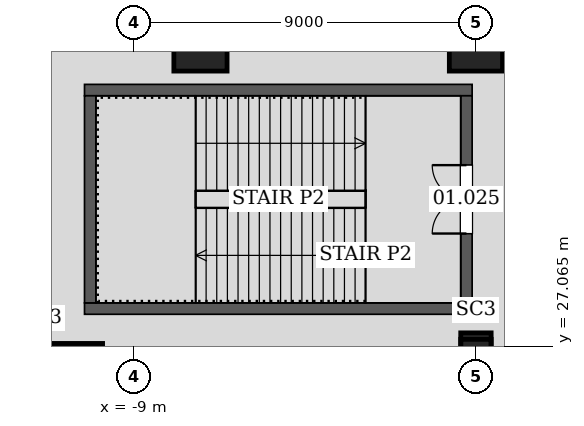
"""IFC4 building model, lengths in metres.
Left out: names, types, materials, properties, quantities, classifications, styles, units other than length and angle.
Written with IfcOpenShell. Run it as: python <this file> out.ifc"""

import sys

from ifc_helpers import new_model, si_unit, direction, frame, frame_2d, origin, origin_2d, place, context, subcontext, project, spatial, rectangle, hollow_rectangle, extrude, element, fill, save


model = new_model("IFC4")
c1 = context("Model", 3, precision=1e-05, world=origin(), true_north=direction((0.0, 1.0)))
c2 = subcontext(c1, "Body", "Model", "MODEL_VIEW")
j1 = project(units=[si_unit("LENGTHUNIT", "METRE"), si_unit("PLANEANGLEUNIT", "RADIAN")], contexts=[c1])
p1 = place(None, origin())
s1 = spatial("IfcSite", under=j1, at=p1, CompositionType="ELEMENT")
p2 = place(p1, origin())
s2 = spatial("IfcBuilding", under=s1, at=p2, CompositionType="ELEMENT")
p3 = place(p2, frame((0.0, 0.0, 7.2)))
s3 = spatial("IfcBuildingStorey", under=s2, at=p3, CompositionType="ELEMENT", Elevation=7.2)
p4 = place(p3, frame((-10.824, 26.133, 0.0), z_axis=(0.011713263234, -0.028266381762, 0.999531795956), x_axis=(0.923822387517, 0.38282136346, 0.0)))
e1 = element("IfcColumn", 1, at=p4, inside=s3, PredefinedType="COLUMN", context=c2, shape_type="SweptSolid", body=[
    extrude(hollow_rectangle(XDim=2.0, YDim=2.0, WallThickness=0.09, at=origin_2d()), origin(), (0.0, 0.0, 1.0), 6.003),
])
p5 = place(p3, frame((0.0, 27.011, 0.0), z_axis=(0.0, -0.028268321043, 0.999600371161), x_axis=(1.0, 0.0, 0.0)))
e2 = element("IfcColumn", 2, at=p5, inside=s3, PredefinedType="COLUMN", context=c2, shape_type="SweptSolid", body=[
    extrude(hollow_rectangle(XDim=0.8, YDim=0.8, WallThickness=0.05, at=origin_2d()), origin(), (0.0, 0.0, 1.0), 6.002),
])
for number, where, z_axis, x_axis in (
    (3, (0.0, 35.0, 0.0), (0.0, 0.0, 1.0), (1.0, 0.0, 0.0)),
    (4, (-7.249, 35.0, 0.0), (0.0, 0.0, 1.0), (1.0, 0.0, 0.0)),
):
    element("IfcColumn", number, at=place(p3, frame(where, z_axis=z_axis, x_axis=x_axis)), inside=s3, PredefinedType="COLUMN", context=c2, shape_type="SweptSolid", body=[
        extrude(rectangle(XDim=1.4, YDim=1.4, at=origin_2d()), origin(), (0.0, 0.0, 1.0), 6.0),
    ])
for number, where, z_axis, x_axis in (
    (5, (-10.3, 28.05, 0.0), (0.0, 0.0, 1.0), (1.0, 0.0, 0.0)),
    (6, (-0.1, 33.8, 0.0), (0.0, 0.0, 1.0), (-1.0, 0.0, 0.0)),
):
    element("IfcWall", number, at=place(p3, frame(where, z_axis=z_axis, x_axis=x_axis)), inside=s3, PredefinedType="SOLIDWALL", context=c2, shape_type="SweptSolid", body=[
        extrude(rectangle(XDim=10.2, YDim=0.3, at=frame_2d((5.1, 0.0))), origin(), (0.0, 0.0, 1.0), 6.0),
    ])
p6 = place(p3, frame((-10.15, 33.65, 0.0), z_axis=(0.0, 0.0, 1.0), x_axis=(0.0, -1.0, 0.0)))
e7 = element("IfcWall", 7, at=p6, inside=s3, PredefinedType="SOLIDWALL", context=c2, shape_type="SweptSolid", body=[
    extrude(rectangle(XDim=5.45, YDim=0.3, at=frame_2d((2.725, 0.0))), origin(), (0.0, 0.0, 1.0), 6.0),
])
p7 = place(p3, frame((-0.25, 28.2, 0.0), z_axis=(0.0, 0.0, 1.0), x_axis=(0.0, 1.0, 0.0)))
e8 = element("IfcWall", 8, at=p7, inside=s3, PredefinedType="SOLIDWALL", context=c2, shape_type="SweptSolid", body=[
    extrude(rectangle(XDim=5.45, YDim=0.3, at=frame_2d((2.725, 0.0))), origin(), (0.0, 0.0, 1.0), 6.0),
])
p8 = place(p7, frame((1.825, 0.0, 0.0)))
e9 = element("IfcOpeningElement", 9, at=p8, cuts=e8, PredefinedType="OPENING", context=c2, shape_type="SweptSolid", body=[
    extrude(rectangle(XDim=1.8, YDim=2.1, at=frame_2d((0.9, 1.05))), frame((0.0, 0.16, 0.0), z_axis=(0.0, -1.0, 0.0), x_axis=(1.0, 0.0, 0.0)), (0.0, 0.0, 1.0), 0.32),
])
p9 = place(p8, origin())
e10 = element("IfcDoor", 10, at=p9, inside=s3, OperationType="DOUBLE_DOOR_SINGLE_SWING", PredefinedType="DOOR", context=c2, shape_type="SweptSolid", body=[
    extrude(rectangle(XDim=1.8, YDim=2.1, at=frame_2d((0.9, 1.05))), frame((0.0, 0.025, 0.0), z_axis=(0.0, -1.0, 0.0), x_axis=(1.0, 0.0, 0.0)), (0.0, 0.0, 1.0), 0.05),
])
fill(e9, e10)
save(model, sys.argv[1])
